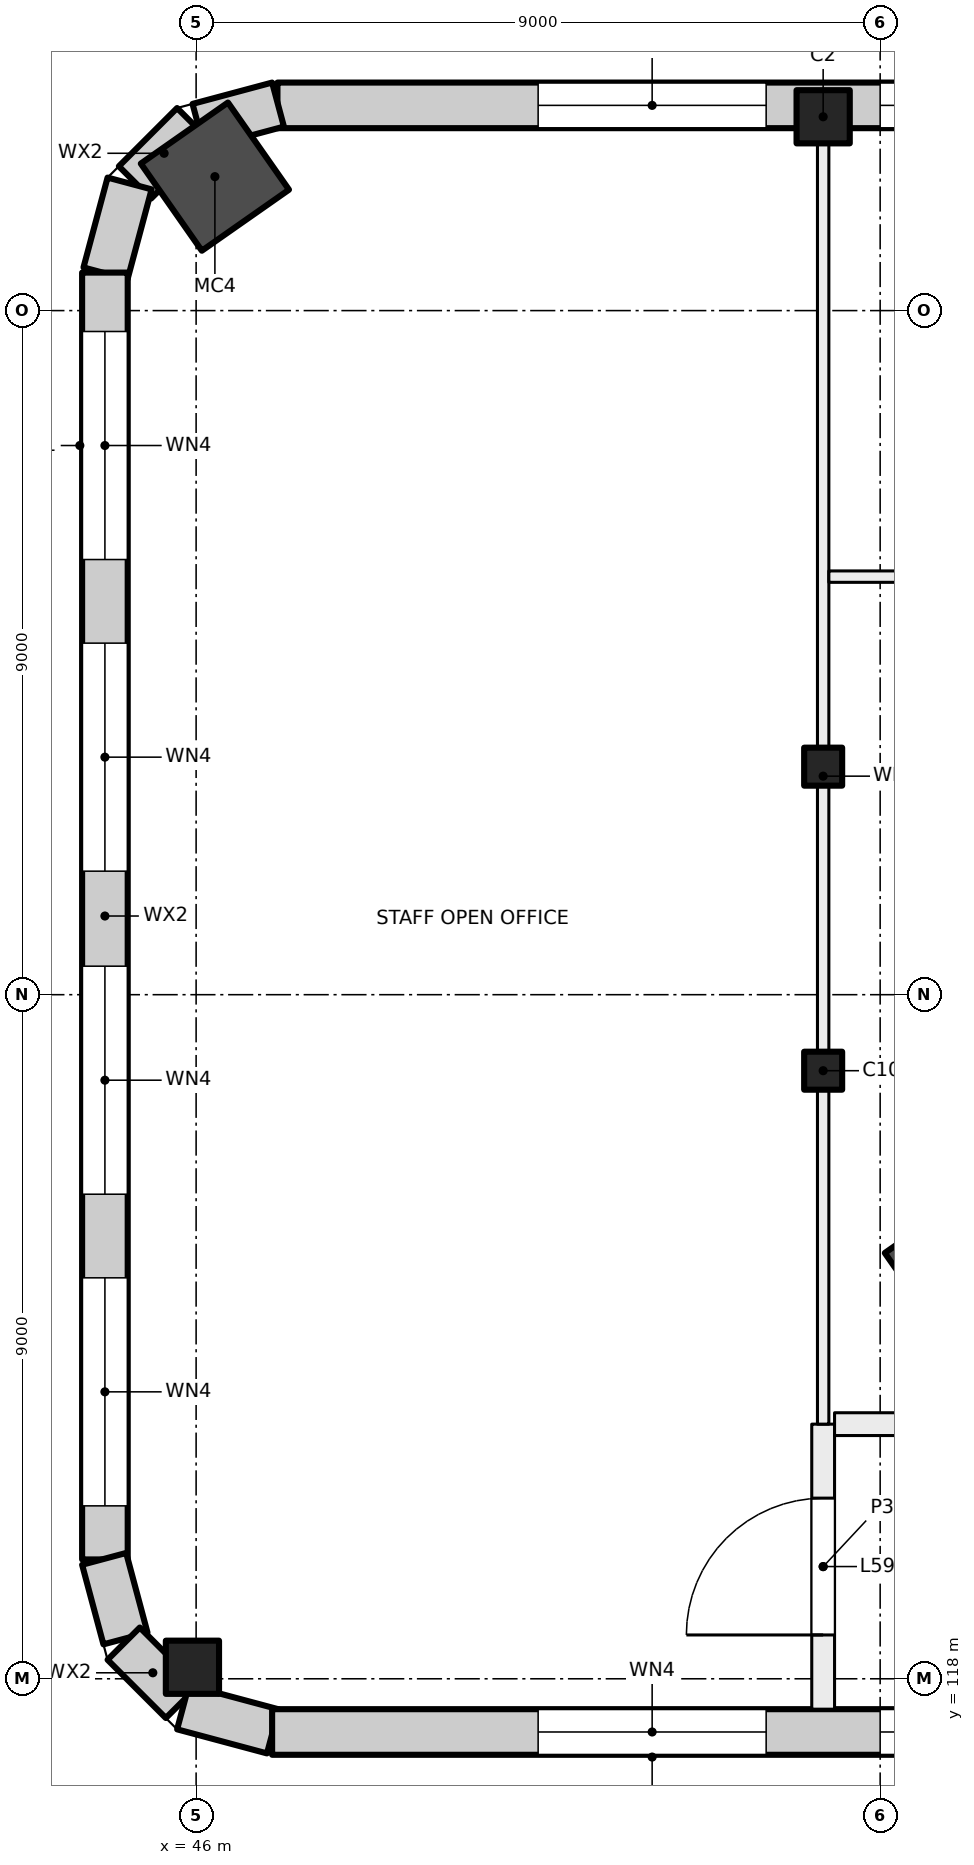
"""IFC4 building model, lengths in metres.
Left out: names, types, materials, properties, quantities, classifications, styles, units other than length and angle.
Written with IfcOpenShell. Run it as: python <this file> out.ifc"""

import sys

from ifc_helpers import new_model, si_unit, direction, frame, frame_2d, origin, origin_2d, place, context, subcontext, project, spatial, rectangle, hollow_rectangle, extrude, element, fill, save


model = new_model("IFC4")
c1 = context("Model", 3, precision=1e-05, world=origin(), true_north=direction((0.0, 1.0)))
c2 = subcontext(c1, "Body", "Model", "MODEL_VIEW")
j1 = project(units=[si_unit("LENGTHUNIT", "METRE"), si_unit("PLANEANGLEUNIT", "RADIAN")], contexts=[c1])
p1 = place(None, origin())
s1 = spatial("IfcSite", under=j1, at=p1, CompositionType="ELEMENT")
p2 = place(p1, origin())
s2 = spatial("IfcBuilding", under=s1, at=p2, CompositionType="ELEMENT")
p3 = place(p2, frame((0.0, 0.0, 249.5)))
s3 = spatial("IfcBuildingStorey", under=s2, at=p3, CompositionType="ELEMENT", Elevation=249.5)
for number, where, z_axis, x_axis in (
    (1, (46.247, 137.762, 0.0), (0.0, 0.0, 1.0), (0.574, -0.819, 0.0)),
    (2, (56.036, 123.43, 0.0), (0.0, 0.0, 1.0), (0.574, -0.819, 0.0)),
):
    element("IfcColumn", number, at=place(p3, frame(where, z_axis=z_axis, x_axis=x_axis)), inside=s3, PredefinedType="COLUMN", context=c2, shape_type="SweptSolid", body=[
        extrude(hollow_rectangle(XDim=1.4, YDim=1.4, WallThickness=0.025, at=origin_2d()), origin(), (0.0, 0.0, 1.0), 4.0),
    ])
for number, where, z_axis, x_axis in (
    (3, (54.25, 130.0, 0.0), (0.0, 0.0, 1.0), (1.0, 0.0, 0.0)),
    (4, (54.25, 126.0, 0.0), (0.0, 0.0, 1.0), (1.0, 0.0, 0.0)),
):
    element("IfcColumn", number, at=place(p3, frame(where, z_axis=z_axis, x_axis=x_axis)), inside=s3, PredefinedType="COLUMN", context=c2, shape_type="SweptSolid", body=[
        extrude(rectangle(XDim=0.5, YDim=0.5, at=origin_2d()), origin(), (0.0, 0.0, 1.0), 4.0),
    ])
for number, where, z_axis, x_axis in (
    (5, (54.25, 138.55, 0.0), (0.0, 0.0, 1.0), (1.0, 0.0, 0.0)),
    (6, (45.952, 118.152, 0.0), (0.0, 0.0, 1.0), (1.0, 0.0, 0.0)),
):
    element("IfcColumn", number, at=place(p3, frame(where, z_axis=z_axis, x_axis=x_axis)), inside=s3, PredefinedType="COLUMN", context=c2, shape_type="SweptSolid", body=[
        extrude(rectangle(XDim=0.7, YDim=0.7, at=origin_2d()), origin(), (0.0, 0.0, 1.0), 4.0),
    ])
p4 = place(p3, frame((47.07, 138.7, 0.0), z_axis=(0.0, 0.0, 1.0), x_axis=(1.0, 0.0, 0.0)))
e7 = element("IfcWall", 7, at=p4, inside=s3, PredefinedType="SOLIDWALL", context=c2, shape_type="SweptSolid", body=[
    extrude(rectangle(XDim=43.91, YDim=0.6, at=frame_2d((21.955, 0.0))), origin(), (0.0, 0.0, 1.0), 3.625),
])
p5 = place(p4, frame((3.43, 0.0, 0.9)))
e8 = element("IfcOpeningElement", 8, at=p5, cuts=e7, PredefinedType="OPENING", context=c2, shape_type="SweptSolid", body=[
    extrude(rectangle(XDim=3.0, YDim=2.4, at=frame_2d((1.5, 1.2))), frame((0.0, 0.31, 0.0), z_axis=(0.0, -1.0, 0.0), x_axis=(1.0, 0.0, 0.0)), (0.0, 0.0, 1.0), 0.62),
])
p6 = place(p4, frame((7.93, 0.0, 0.9)))
e9 = element("IfcOpeningElement", 9, at=p6, cuts=e7, PredefinedType="OPENING", context=c2, shape_type="SweptSolid", body=[
    extrude(rectangle(XDim=3.0, YDim=2.4, at=frame_2d((1.5, 1.2))), frame((0.0, 0.31, 0.0), z_axis=(0.0, -1.0, 0.0), x_axis=(1.0, 0.0, 0.0)), (0.0, 0.0, 1.0), 0.62),
])
p7 = place(p4, frame((12.43, 0.0, 0.9)))
e10 = element("IfcOpeningElement", 10, at=p7, cuts=e7, PredefinedType="OPENING", context=c2, shape_type="SweptSolid", body=[
    extrude(rectangle(XDim=3.0, YDim=2.4, at=frame_2d((1.5, 1.2))), frame((0.0, 0.31, 0.0), z_axis=(0.0, -1.0, 0.0), x_axis=(1.0, 0.0, 0.0)), (0.0, 0.0, 1.0), 0.62),
])
p8 = place(p4, frame((16.93, 0.0, 0.9)))
e11 = element("IfcOpeningElement", 11, at=p8, cuts=e7, PredefinedType="OPENING", context=c2, shape_type="SweptSolid", body=[
    extrude(rectangle(XDim=3.0, YDim=2.4, at=frame_2d((1.5, 1.2))), frame((0.0, 0.31, 0.0), z_axis=(0.0, -1.0, 0.0), x_axis=(1.0, 0.0, 0.0)), (0.0, 0.0, 1.0), 0.62),
])
p9 = place(p4, frame((21.43, 0.0, 0.9)))
e12 = element("IfcOpeningElement", 12, at=p9, cuts=e7, PredefinedType="OPENING", context=c2, shape_type="SweptSolid", body=[
    extrude(rectangle(XDim=3.0, YDim=2.4, at=frame_2d((1.5, 1.2))), frame((0.0, 0.31, 0.0), z_axis=(0.0, -1.0, 0.0), x_axis=(1.0, 0.0, 0.0)), (0.0, 0.0, 1.0), 0.62),
])
p10 = place(p4, frame((25.93, 0.0, 0.9)))
e13 = element("IfcOpeningElement", 13, at=p10, cuts=e7, PredefinedType="OPENING", context=c2, shape_type="SweptSolid", body=[
    extrude(rectangle(XDim=3.0, YDim=2.4, at=frame_2d((1.5, 1.2))), frame((0.0, 0.31, 0.0), z_axis=(0.0, -1.0, 0.0), x_axis=(1.0, 0.0, 0.0)), (0.0, 0.0, 1.0), 0.62),
])
p11 = place(p4, frame((30.43, 0.0, 0.9)))
e14 = element("IfcOpeningElement", 14, at=p11, cuts=e7, PredefinedType="OPENING", context=c2, shape_type="SweptSolid", body=[
    extrude(rectangle(XDim=3.0, YDim=2.4, at=frame_2d((1.5, 1.2))), frame((0.0, 0.31, 0.0), z_axis=(0.0, -1.0, 0.0), x_axis=(1.0, 0.0, 0.0)), (0.0, 0.0, 1.0), 0.62),
])
p12 = place(p4, frame((34.93, 0.0, 0.9)))
e15 = element("IfcOpeningElement", 15, at=p12, cuts=e7, PredefinedType="OPENING", context=c2, shape_type="SweptSolid", body=[
    extrude(rectangle(XDim=3.0, YDim=2.4, at=frame_2d((1.5, 1.2))), frame((0.0, 0.31, 0.0), z_axis=(0.0, -1.0, 0.0), x_axis=(1.0, 0.0, 0.0)), (0.0, 0.0, 1.0), 0.62),
])
p13 = place(p4, frame((39.43, 0.0, 0.9)))
e16 = element("IfcOpeningElement", 16, at=p13, cuts=e7, PredefinedType="OPENING", context=c2, shape_type="SweptSolid", body=[
    extrude(rectangle(XDim=3.0, YDim=2.4, at=frame_2d((1.5, 1.2))), frame((0.0, 0.31, 0.0), z_axis=(0.0, -1.0, 0.0), x_axis=(1.0, 0.0, 0.0)), (0.0, 0.0, 1.0), 0.62),
])
p14 = place(p3, frame((46.031, 138.43, 0.0), z_axis=(0.0, 0.0, 1.0), x_axis=(0.965939004864, 0.25876985698, 0.0)))
e17 = element("IfcWall", 17, at=p14, inside=s3, PredefinedType="SOLIDWALL", context=c2, shape_type="SweptSolid", body=[
    extrude(rectangle(XDim=1.084, YDim=0.6, at=frame_2d((0.542, 0.0))), origin(), (0.0, 0.0, 1.0), 3.625),
])
p15 = place(p3, frame((45.196, 137.686, 0.0), z_axis=(0.0, 0.0, 1.0), x_axis=(0.707106781187, 0.707106781187, 0.0)))
e18 = element("IfcWall", 18, at=p15, inside=s3, PredefinedType="SOLIDWALL", context=c2, shape_type="SweptSolid", body=[
    extrude(rectangle(XDim=1.084, YDim=0.6, at=frame_2d((0.542, 0.0))), origin(), (0.0, 0.0, 1.0), 3.625),
])
p16 = place(p3, frame((44.808, 136.49, 0.0), z_axis=(0.0, 0.0, 1.0), x_axis=(0.258878975098, 0.965909766102, 0.0)))
e19 = element("IfcWall", 19, at=p16, inside=s3, PredefinedType="SOLIDWALL", context=c2, shape_type="SweptSolid", body=[
    extrude(rectangle(XDim=1.224, YDim=0.6, at=frame_2d((0.612, 0.0))), origin(), (0.0, 0.0, 1.0), 3.625),
])
p17 = place(p3, frame((44.8, 119.57, 0.0), z_axis=(0.0, 0.0, 1.0), x_axis=(0.0, 1.0, 0.0)))
e20 = element("IfcWall", 20, at=p17, inside=s3, PredefinedType="SOLIDWALL", context=c2, shape_type="SweptSolid", body=[
    extrude(rectangle(XDim=16.93, YDim=0.6, at=frame_2d((8.465, 0.0))), origin(), (0.0, 0.0, 1.0), 3.625),
])
p18 = place(p17, frame((0.705, 0.0, 0.9)))
e21 = element("IfcOpeningElement", 21, at=p18, cuts=e20, PredefinedType="OPENING", context=c2, shape_type="SweptSolid", body=[
    extrude(rectangle(XDim=3.0, YDim=2.4, at=frame_2d((1.5, 1.2))), frame((0.0, 0.31, 0.0), z_axis=(0.0, -1.0, 0.0), x_axis=(1.0, 0.0, 0.0)), (0.0, 0.0, 1.0), 0.62),
])
p19 = place(p17, frame((4.805, 0.0, 0.9)))
e22 = element("IfcOpeningElement", 22, at=p19, cuts=e20, PredefinedType="OPENING", context=c2, shape_type="SweptSolid", body=[
    extrude(rectangle(XDim=3.0, YDim=2.4, at=frame_2d((1.5, 1.2))), frame((0.0, 0.31, 0.0), z_axis=(0.0, -1.0, 0.0), x_axis=(1.0, 0.0, 0.0)), (0.0, 0.0, 1.0), 0.62),
])
p20 = place(p17, frame((9.055, 0.0, 0.9)))
e23 = element("IfcOpeningElement", 23, at=p20, cuts=e20, PredefinedType="OPENING", context=c2, shape_type="SweptSolid", body=[
    extrude(rectangle(XDim=3.0, YDim=2.4, at=frame_2d((1.5, 1.2))), frame((0.0, 0.31, 0.0), z_axis=(0.0, -1.0, 0.0), x_axis=(1.0, 0.0, 0.0)), (0.0, 0.0, 1.0), 0.62),
])
p21 = place(p17, frame((13.155, 0.0, 0.9)))
e24 = element("IfcOpeningElement", 24, at=p21, cuts=e20, PredefinedType="OPENING", context=c2, shape_type="SweptSolid", body=[
    extrude(rectangle(XDim=3.0, YDim=2.4, at=frame_2d((1.5, 1.2))), frame((0.0, 0.31, 0.0), z_axis=(0.0, -1.0, 0.0), x_axis=(1.0, 0.0, 0.0)), (0.0, 0.0, 1.0), 0.62),
])
p22 = place(p3, frame((45.07, 118.531, 0.0), z_axis=(0.0, 0.0, 1.0), x_axis=(-0.25876985698, 0.965939004864, 0.0)))
e25 = element("IfcWall", 25, at=p22, inside=s3, PredefinedType="SOLIDWALL", context=c2, shape_type="SweptSolid", body=[
    extrude(rectangle(XDim=1.084, YDim=0.6, at=frame_2d((0.542, 0.0))), origin(), (0.0, 0.0, 1.0), 3.625),
])
p23 = place(p3, frame((45.814, 117.696, 0.0), z_axis=(0.0, 0.0, 1.0), x_axis=(-0.707106781187, 0.707106781187, 0.0)))
e26 = element("IfcWall", 26, at=p23, inside=s3, PredefinedType="SOLIDWALL", context=c2, shape_type="SweptSolid", body=[
    extrude(rectangle(XDim=1.084, YDim=0.6, at=frame_2d((0.542, 0.0))), origin(), (0.0, 0.0, 1.0), 3.625),
])
p24 = place(p3, frame((47.01, 117.308, 0.0), z_axis=(0.0, 0.0, 1.0), x_axis=(-0.965909766102, 0.258878975098, 0.0)))
e27 = element("IfcWall", 27, at=p24, inside=s3, PredefinedType="SOLIDWALL", context=c2, shape_type="SweptSolid", body=[
    extrude(rectangle(XDim=1.224, YDim=0.6, at=frame_2d((0.612, 0.0))), origin(), (0.0, 0.0, 1.0), 3.625),
])
p25 = place(p3, frame((90.98, 117.3, 0.0), z_axis=(0.0, 0.0, 1.0), x_axis=(-1.0, 0.0, 0.0)))
e28 = element("IfcWall", 28, at=p25, inside=s3, PredefinedType="SOLIDWALL", context=c2, shape_type="SweptSolid", body=[
    extrude(rectangle(XDim=43.98, YDim=0.6, at=frame_2d((21.99, 0.0))), origin(), (0.0, 0.0, 1.0), 3.625),
])
p26 = place(p25, frame((1.48, 0.0, 0.9)))
e29 = element("IfcOpeningElement", 29, at=p26, cuts=e28, PredefinedType="OPENING", context=c2, shape_type="SweptSolid", body=[
    extrude(rectangle(XDim=3.0, YDim=2.4, at=frame_2d((1.5, 1.2))), frame((0.0, 0.31, 0.0), z_axis=(0.0, -1.0, 0.0), x_axis=(1.0, 0.0, 0.0)), (0.0, 0.0, 1.0), 0.62),
])
p27 = place(p25, frame((5.98, 0.0, 0.9)))
e30 = element("IfcOpeningElement", 30, at=p27, cuts=e28, PredefinedType="OPENING", context=c2, shape_type="SweptSolid", body=[
    extrude(rectangle(XDim=3.0, YDim=2.4, at=frame_2d((1.5, 1.2))), frame((0.0, 0.31, 0.0), z_axis=(0.0, -1.0, 0.0), x_axis=(1.0, 0.0, 0.0)), (0.0, 0.0, 1.0), 0.62),
])
p28 = place(p25, frame((10.48, 0.0, 0.9)))
e31 = element("IfcOpeningElement", 31, at=p28, cuts=e28, PredefinedType="OPENING", context=c2, shape_type="SweptSolid", body=[
    extrude(rectangle(XDim=3.0, YDim=2.4, at=frame_2d((1.5, 1.2))), frame((0.0, 0.31, 0.0), z_axis=(0.0, -1.0, 0.0), x_axis=(1.0, 0.0, 0.0)), (0.0, 0.0, 1.0), 0.62),
])
p29 = place(p25, frame((14.98, 0.0, 0.9)))
e32 = element("IfcOpeningElement", 32, at=p29, cuts=e28, PredefinedType="OPENING", context=c2, shape_type="SweptSolid", body=[
    extrude(rectangle(XDim=3.0, YDim=2.4, at=frame_2d((1.5, 1.2))), frame((0.0, 0.31, 0.0), z_axis=(0.0, -1.0, 0.0), x_axis=(1.0, 0.0, 0.0)), (0.0, 0.0, 1.0), 0.62),
])
p30 = place(p25, frame((19.48, 0.0, 0.9)))
e33 = element("IfcOpeningElement", 33, at=p30, cuts=e28, PredefinedType="OPENING", context=c2, shape_type="SweptSolid", body=[
    extrude(rectangle(XDim=3.0, YDim=2.4, at=frame_2d((1.5, 1.2))), frame((0.0, 0.31, 0.0), z_axis=(0.0, -1.0, 0.0), x_axis=(1.0, 0.0, 0.0)), (0.0, 0.0, 1.0), 0.62),
])
p31 = place(p25, frame((23.98, 0.0, 0.9)))
e34 = element("IfcOpeningElement", 34, at=p31, cuts=e28, PredefinedType="OPENING", context=c2, shape_type="SweptSolid", body=[
    extrude(rectangle(XDim=3.0, YDim=2.4, at=frame_2d((1.5, 1.2))), frame((0.0, 0.31, 0.0), z_axis=(0.0, -1.0, 0.0), x_axis=(1.0, 0.0, 0.0)), (0.0, 0.0, 1.0), 0.62),
])
p32 = place(p25, frame((28.48, 0.0, 0.9)))
e35 = element("IfcOpeningElement", 35, at=p32, cuts=e28, PredefinedType="OPENING", context=c2, shape_type="SweptSolid", body=[
    extrude(rectangle(XDim=3.0, YDim=2.4, at=frame_2d((1.5, 1.2))), frame((0.0, 0.31, 0.0), z_axis=(0.0, -1.0, 0.0), x_axis=(1.0, 0.0, 0.0)), (0.0, 0.0, 1.0), 0.62),
])
p33 = place(p25, frame((32.98, 0.0, 0.9)))
e36 = element("IfcOpeningElement", 36, at=p33, cuts=e28, PredefinedType="OPENING", context=c2, shape_type="SweptSolid", body=[
    extrude(rectangle(XDim=3.0, YDim=2.4, at=frame_2d((1.5, 1.2))), frame((0.0, 0.31, 0.0), z_axis=(0.0, -1.0, 0.0), x_axis=(1.0, 0.0, 0.0)), (0.0, 0.0, 1.0), 0.62),
])
p34 = place(p25, frame((37.48, 0.0, 0.9)))
e37 = element("IfcOpeningElement", 37, at=p34, cuts=e28, PredefinedType="OPENING", context=c2, shape_type="SweptSolid", body=[
    extrude(rectangle(XDim=3.0, YDim=2.4, at=frame_2d((1.5, 1.2))), frame((0.0, 0.31, 0.0), z_axis=(0.0, -1.0, 0.0), x_axis=(1.0, 0.0, 0.0)), (0.0, 0.0, 1.0), 0.62),
])
p35 = place(p3, frame((54.25, 117.6, 0.0), z_axis=(0.0, 0.0, 1.0), x_axis=(0.0, 1.0, 0.0)))
e38 = element("IfcWall", 38, at=p35, inside=s3, PredefinedType="PARTITIONING", context=c2, shape_type="SweptSolid", body=[
    extrude(rectangle(XDim=3.75, YDim=0.3, at=frame_2d((1.875, 0.0))), origin(), (0.0, 0.0, 1.0), 3.625),
])
p36 = place(p35, frame((0.977, 0.0, 0.0)))
e39 = element("IfcOpeningElement", 39, at=p36, cuts=e38, PredefinedType="OPENING", context=c2, shape_type="SweptSolid", body=[
    extrude(rectangle(XDim=1.8, YDim=2.1, at=frame_2d((0.9, 1.05))), frame((0.0, 0.16, 0.0), z_axis=(0.0, -1.0, 0.0), x_axis=(1.0, 0.0, 0.0)), (0.0, 0.0, 1.0), 0.32),
])
p37 = place(p3, frame((54.25, 121.35, 0.0), z_axis=(0.0, 0.0, 1.0), x_axis=(0.0, 1.0, 0.0)))
e40 = element("IfcWall", 40, at=p37, inside=s3, PredefinedType="PARTITIONING", context=c2, shape_type="SweptSolid", body=[
    extrude(rectangle(XDim=17.05, YDim=0.15, at=frame_2d((8.525, 0.0))), origin(), (0.0, 0.0, 1.0), 3.625),
])
p38 = place(p3, frame((54.4, 121.35, 0.0), z_axis=(0.0, 0.0, 1.0), x_axis=(1.0, 0.0, 0.0)))
e41 = element("IfcWall", 41, at=p38, inside=s3, PredefinedType="PARTITIONING", context=c2, shape_type="SweptSolid", body=[
    extrude(rectangle(XDim=31.412, YDim=0.3, at=frame_2d((15.706, 0.0))), origin(), (0.0, 0.0, 1.0), 3.625),
])
p39 = place(p38, frame((26.35, 0.0, 0.0)))
e42 = element("IfcOpeningElement", 42, at=p39, cuts=e41, PredefinedType="OPENING", context=c2, shape_type="SweptSolid", body=[
    extrude(rectangle(XDim=1.0, YDim=2.1, at=frame_2d((0.5, 1.05))), frame((0.0, 0.16, 0.0), z_axis=(0.0, -1.0, 0.0), x_axis=(1.0, 0.0, 0.0)), (0.0, 0.0, 1.0), 0.32),
])
p40 = place(p38, frame((19.2, 0.0, 0.0)))
e43 = element("IfcOpeningElement", 43, at=p40, cuts=e41, PredefinedType="OPENING", context=c2, shape_type="SweptSolid", body=[
    extrude(rectangle(XDim=1.8, YDim=2.1, at=frame_2d((0.9, 1.05))), frame((0.0, 0.16, 0.0), z_axis=(0.0, -1.0, 0.0), x_axis=(1.0, 0.0, 0.0)), (0.0, 0.0, 1.0), 0.32),
])
p41 = place(p38, frame((15.0, 0.0, 0.0)))
e44 = element("IfcOpeningElement", 44, at=p41, cuts=e41, PredefinedType="OPENING", context=c2, shape_type="SweptSolid", body=[
    extrude(rectangle(XDim=1.2, YDim=2.1, at=frame_2d((0.6, 1.05))), frame((0.0, 0.16, 0.0), z_axis=(0.0, -1.0, 0.0), x_axis=(1.0, 0.0, 0.0)), (0.0, 0.0, 1.0), 0.32),
])
p42 = place(p38, frame((11.45, 0.0, 0.0)))
e45 = element("IfcOpeningElement", 45, at=p42, cuts=e41, PredefinedType="OPENING", context=c2, shape_type="SweptSolid", body=[
    extrude(rectangle(XDim=0.8, YDim=2.1, at=frame_2d((0.4, 1.05))), frame((0.0, 0.16, 0.0), z_axis=(0.0, -1.0, 0.0), x_axis=(1.0, 0.0, 0.0)), (0.0, 0.0, 1.0), 0.32),
])
p43 = place(p38, frame((3.515, 0.0, 0.0)))
e46 = element("IfcOpeningElement", 46, at=p43, cuts=e41, PredefinedType="OPENING", context=c2, shape_type="SweptSolid", body=[
    extrude(rectangle(XDim=1.8, YDim=2.1, at=frame_2d((0.9, 1.05))), frame((0.0, 0.16, 0.0), z_axis=(0.0, -1.0, 0.0), x_axis=(1.0, 0.0, 0.0)), (0.0, 0.0, 1.0), 0.32),
])
p44 = place(p3, frame((63.25, 132.5, 0.0), z_axis=(0.0, 0.0, 1.0), x_axis=(-1.0, 0.0, 0.0)))
e47 = element("IfcWall", 47, at=p44, inside=s3, PredefinedType="PARTITIONING", context=c2, shape_type="SweptSolid", body=[
    extrude(rectangle(XDim=8.925, YDim=0.15, at=frame_2d((4.462, 0.0))), origin(), (0.0, 0.0, 1.0), 3.625),
])
p45 = place(p44, frame((1.75, 0.0, 0.0)))
e48 = element("IfcOpeningElement", 48, at=p45, cuts=e47, PredefinedType="OPENING", context=c2, shape_type="SweptSolid", body=[
    extrude(rectangle(XDim=1.0, YDim=2.1, at=frame_2d((0.5, 1.05))), frame((0.0, 0.085, 0.0), z_axis=(0.0, -1.0, 0.0), x_axis=(1.0, 0.0, 0.0)), (0.0, 0.0, 1.0), 0.17),
])
p46 = place(p44, frame((6.222, 0.0, 0.0)))
e49 = element("IfcOpeningElement", 49, at=p46, cuts=e47, PredefinedType="OPENING", context=c2, shape_type="SweptSolid", body=[
    extrude(rectangle(XDim=1.0, YDim=2.1, at=frame_2d((0.5, 1.05))), frame((0.0, 0.085, 0.0), z_axis=(0.0, -1.0, 0.0), x_axis=(1.0, 0.0, 0.0)), (0.0, 0.0, 1.0), 0.17),
])
p47 = place(p5, origin())
e50 = element("IfcWindow", 50, at=p47, inside=s3, PartitioningType="SINGLE_PANEL", PredefinedType="WINDOW", context=c2, shape_type="SweptSolid", body=[
    extrude(rectangle(XDim=3.0, YDim=2.4, at=frame_2d((1.5, 1.2))), frame((0.0, 0.03, 0.0), z_axis=(0.0, -1.0, 0.0), x_axis=(1.0, 0.0, 0.0)), (0.0, 0.0, 1.0), 0.06),
])
fill(e8, e50)
p48 = place(p6, origin())
e51 = element("IfcWindow", 51, at=p48, inside=s3, PartitioningType="SINGLE_PANEL", PredefinedType="WINDOW", context=c2, shape_type="SweptSolid", body=[
    extrude(rectangle(XDim=3.0, YDim=2.4, at=frame_2d((1.5, 1.2))), frame((0.0, 0.03, 0.0), z_axis=(0.0, -1.0, 0.0), x_axis=(1.0, 0.0, 0.0)), (0.0, 0.0, 1.0), 0.06),
])
fill(e9, e51)
p49 = place(p18, origin())
e52 = element("IfcWindow", 52, at=p49, inside=s3, PartitioningType="SINGLE_PANEL", PredefinedType="WINDOW", context=c2, shape_type="SweptSolid", body=[
    extrude(rectangle(XDim=3.0, YDim=2.4, at=frame_2d((1.5, 1.2))), frame((0.0, 0.03, 0.0), z_axis=(0.0, -1.0, 0.0), x_axis=(1.0, 0.0, 0.0)), (0.0, 0.0, 1.0), 0.06),
])
fill(e21, e52)
p50 = place(p19, origin())
e53 = element("IfcWindow", 53, at=p50, inside=s3, PartitioningType="SINGLE_PANEL", PredefinedType="WINDOW", context=c2, shape_type="SweptSolid", body=[
    extrude(rectangle(XDim=3.0, YDim=2.4, at=frame_2d((1.5, 1.2))), frame((0.0, 0.03, 0.0), z_axis=(0.0, -1.0, 0.0), x_axis=(1.0, 0.0, 0.0)), (0.0, 0.0, 1.0), 0.06),
])
fill(e22, e53)
p51 = place(p20, origin())
e54 = element("IfcWindow", 54, at=p51, inside=s3, PartitioningType="SINGLE_PANEL", PredefinedType="WINDOW", context=c2, shape_type="SweptSolid", body=[
    extrude(rectangle(XDim=3.0, YDim=2.4, at=frame_2d((1.5, 1.2))), frame((0.0, 0.03, 0.0), z_axis=(0.0, -1.0, 0.0), x_axis=(1.0, 0.0, 0.0)), (0.0, 0.0, 1.0), 0.06),
])
fill(e23, e54)
p52 = place(p21, origin())
e55 = element("IfcWindow", 55, at=p52, inside=s3, PartitioningType="SINGLE_PANEL", PredefinedType="WINDOW", context=c2, shape_type="SweptSolid", body=[
    extrude(rectangle(XDim=3.0, YDim=2.4, at=frame_2d((1.5, 1.2))), frame((0.0, 0.03, 0.0), z_axis=(0.0, -1.0, 0.0), x_axis=(1.0, 0.0, 0.0)), (0.0, 0.0, 1.0), 0.06),
])
fill(e24, e55)
p53 = place(p33, origin())
e56 = element("IfcWindow", 56, at=p53, inside=s3, PartitioningType="SINGLE_PANEL", PredefinedType="WINDOW", context=c2, shape_type="SweptSolid", body=[
    extrude(rectangle(XDim=3.0, YDim=2.4, at=frame_2d((1.5, 1.2))), frame((0.0, 0.03, 0.0), z_axis=(0.0, -1.0, 0.0), x_axis=(1.0, 0.0, 0.0)), (0.0, 0.0, 1.0), 0.06),
])
fill(e36, e56)
p54 = place(p34, origin())
e57 = element("IfcWindow", 57, at=p54, inside=s3, PartitioningType="SINGLE_PANEL", PredefinedType="WINDOW", context=c2, shape_type="SweptSolid", body=[
    extrude(rectangle(XDim=3.0, YDim=2.4, at=frame_2d((1.5, 1.2))), frame((0.0, 0.03, 0.0), z_axis=(0.0, -1.0, 0.0), x_axis=(1.0, 0.0, 0.0)), (0.0, 0.0, 1.0), 0.06),
])
fill(e37, e57)
p55 = place(p36, origin())
e58 = element("IfcDoor", 58, at=p55, inside=s3, OperationType="DOUBLE_DOOR_SINGLE_SWING", PredefinedType="DOOR", context=c2, shape_type="SweptSolid", body=[
    extrude(rectangle(XDim=1.8, YDim=2.1, at=frame_2d((0.9, 1.05))), frame((0.0, 0.025, 0.0), z_axis=(0.0, -1.0, 0.0), x_axis=(1.0, 0.0, 0.0)), (0.0, 0.0, 1.0), 0.05),
])
fill(e39, e58)
save(model, sys.argv[1])
